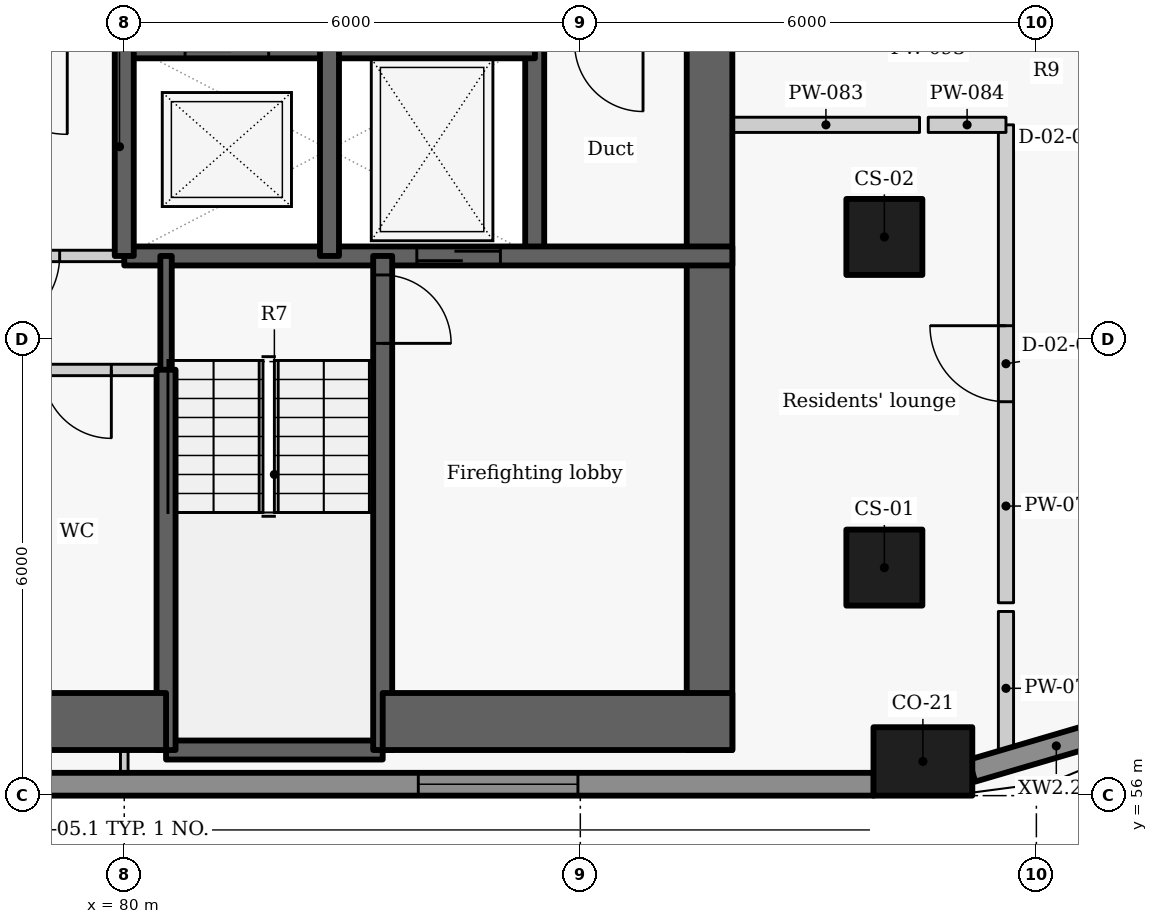
"""IFC4 building model, lengths in metres.
Left out: names, types, materials, properties, quantities, classifications, styles, units other than length and angle.
Written with IfcOpenShell. Run it as: python <this file> out.ifc"""

import sys

from ifc_helpers import new_model, si_unit, direction, frame, frame_2d, origin, origin_2d, place, context, subcontext, project, spatial, rectangle, extrude, element, fill, save


model = new_model("IFC4")
c1 = context("Model", 3, precision=1e-05, world=origin(), true_north=direction((0.0, 1.0)))
c2 = subcontext(c1, "Body", "Model", "MODEL_VIEW")
j1 = project(units=[si_unit("LENGTHUNIT", "METRE"), si_unit("PLANEANGLEUNIT", "RADIAN")], contexts=[c1])
p1 = place(None, origin())
s1 = spatial("IfcSite", under=j1, at=p1, CompositionType="ELEMENT")
p2 = place(p1, origin())
s2 = spatial("IfcBuilding", under=s1, at=p2, CompositionType="ELEMENT")
p3 = place(p2, frame((0.0, 0.0, 160.2)))
s3 = spatial("IfcBuildingStorey", under=s2, at=p3, CompositionType="ELEMENT", Elevation=160.2)
p4 = place(p3, frame((90.507, 56.45, 0.0), z_axis=(0.0, 0.0, 1.0), x_axis=(1.0, 0.0, 0.0)))
e1 = element("IfcColumn", 1, at=p4, inside=s3, PredefinedType="COLUMN", context=c2, shape_type="SweptSolid", body=[
    extrude(rectangle(XDim=1.3, YDim=0.9, at=origin_2d()), origin(), (0.0, 0.0, 1.0), 3.3),
])
for number, where, z_axis, x_axis in (
    (2, (90.0, 59.0, 0.0), (0.0, 0.0, 1.0), (0.0, 1.0, 0.0)),
    (3, (90.0, 63.35, 0.0), (0.0, 0.0, 1.0), (0.0, 1.0, 0.0)),
):
    element("IfcColumn", number, at=place(p3, frame(where, z_axis=z_axis, x_axis=x_axis)), inside=s3, PredefinedType="COLUMN", context=c2, shape_type="SweptSolid", body=[
        extrude(rectangle(XDim=1.0, YDim=1.0, at=origin_2d()), origin(), (0.0, 0.0, 1.0), 3.3),
    ])
p5 = place(p3, frame((69.821, 56.15, 0.0), z_axis=(0.0, 0.0, 1.0), x_axis=(1.0, 0.0, 0.0)))
e4 = element("IfcWall", 4, at=p5, inside=s3, PredefinedType="SOLIDWALL", context=c2, shape_type="SweptSolid", body=[
    extrude(rectangle(XDim=20.04, YDim=0.3, at=frame_2d((10.02, 0.0))), origin(), (0.0, 0.0, 1.0), 2.425),
])
p6 = place(p5, frame((4.051, 0.0, 0.9)))
e5 = element("IfcOpeningElement", 5, at=p6, cuts=e4, PredefinedType="OPENING", context=c2, shape_type="SweptSolid", body=[
    extrude(rectangle(XDim=2.1, YDim=1.1, at=frame_2d((1.05, 0.55))), frame((0.0, 0.16, 0.0), z_axis=(0.0, -1.0, 0.0), x_axis=(1.0, 0.0, 0.0)), (0.0, 0.0, 1.0), 0.32),
])
p7 = place(p5, frame((14.047, 0.0, 0.9)))
e6 = element("IfcOpeningElement", 6, at=p7, cuts=e4, PredefinedType="OPENING", context=c2, shape_type="SweptSolid", body=[
    extrude(rectangle(XDim=2.1, YDim=1.1, at=frame_2d((1.05, 0.55))), frame((0.0, 0.16, 0.0), z_axis=(0.0, -1.0, 0.0), x_axis=(1.0, 0.0, 0.0)), (0.0, 0.0, 1.0), 0.32),
])
p8 = place(p3, frame((91.153, 56.328, 0.0), z_axis=(0.0, 0.0, 1.0), x_axis=(0.959473072336, 0.281800325517, 0.0)))
e7 = element("IfcWall", 7, at=p8, inside=s3, PredefinedType="SOLIDWALL", context=c2, shape_type="SweptSolid", body=[
    extrude(rectangle(XDim=2.312, YDim=0.3, at=frame_2d((1.156, 0.0))), origin(), (0.0, 0.0, 1.0), 2.425),
])
p9 = place(p3, frame((85.4, 63.1, -0.275), z_axis=(0.0, 0.0, 1.0), x_axis=(0.0, 1.0, 0.0)))
e8 = element("IfcWall", 8, at=p9, inside=s3, PredefinedType="SHEAR", context=c2, shape_type="SweptSolid", body=[
    extrude(rectangle(XDim=2.8, YDim=0.25, at=frame_2d((1.4, 0.0))), origin(), (0.0, 0.0, 1.0), 3.3),
])
p10 = place(p3, frame((87.7, 72.2, -0.275), z_axis=(0.0, 0.0, 1.0), x_axis=(0.0, -1.0, 0.0)))
e9 = element("IfcWall", 9, at=p10, inside=s3, PredefinedType="SHEAR", context=c2, shape_type="SweptSolid", body=[
    extrude(rectangle(XDim=15.6, YDim=0.6, at=frame_2d((7.8, 0.0))), origin(), (0.0, 0.0, 1.0), 3.3),
])
p11 = place(p10, frame((3.852, 0.0, 0.275)))
e10 = element("IfcOpeningElement", 10, at=p11, cuts=e9, PredefinedType="OPENING", context=c2, shape_type="SweptSolid", body=[
    extrude(rectangle(XDim=1.5, YDim=2.1, at=frame_2d((0.75, 1.05))), frame((0.0, 0.31, 0.0), z_axis=(0.0, -1.0, 0.0), x_axis=(1.0, 0.0, 0.0)), (0.0, 0.0, 1.0), 0.62),
])
p12 = place(p3, frame((79.997, 65.9, -0.275), z_axis=(0.0, 0.0, 1.0), x_axis=(1.0, 0.0, 0.0)))
e11 = element("IfcWall", 11, at=p12, inside=s3, PredefinedType="SHEAR", context=c2, shape_type="SweptSolid", body=[
    extrude(rectangle(XDim=5.406, YDim=0.4, at=frame_2d((2.703, 0.0))), origin(), (0.0, 0.0, 1.0), 3.3),
])
p13 = place(p12, frame((0.803, 0.0, 0.275)))
e12 = element("IfcOpeningElement", 12, at=p13, cuts=e11, PredefinedType="OPENING", context=c2, shape_type="SweptSolid", body=[
    extrude(rectangle(XDim=1.1, YDim=2.1, at=frame_2d((0.55, 1.05))), frame((0.0, 0.21, 0.0), z_axis=(0.0, -1.0, 0.0), x_axis=(1.0, 0.0, 0.0)), (0.0, 0.0, 1.0), 0.42),
])
p14 = place(p3, frame((80.0, 63.1, -0.275), z_axis=(0.0, 0.0, 1.0), x_axis=(1.0, 0.0, 0.0)))
e13 = element("IfcWall", 13, at=p14, inside=s3, PredefinedType="SHEAR", context=c2, shape_type="SweptSolid", body=[
    extrude(rectangle(XDim=8.0, YDim=0.25, at=frame_2d((4.0, 0.0))), origin(), (0.0, 0.0, 1.0), 3.3),
])
p15 = place(p14, frame((3.849, 0.0, 0.275)))
e14 = element("IfcOpeningElement", 14, at=p15, cuts=e13, PredefinedType="OPENING", context=c2, shape_type="SweptSolid", body=[
    extrude(rectangle(XDim=1.1, YDim=2.1, at=frame_2d((0.55, 1.05))), frame((0.0, 0.135, 0.0), z_axis=(0.0, -1.0, 0.0), x_axis=(1.0, 0.0, 0.0)), (0.0, 0.0, 1.0), 0.27),
])
p16 = place(p3, frame((80.0, 63.1, -0.275), z_axis=(0.0, 0.0, 1.0), x_axis=(0.0, 1.0, 0.0)))
e15 = element("IfcWall", 15, at=p16, inside=s3, PredefinedType="SHEAR", context=c2, shape_type="SweptSolid", body=[
    extrude(rectangle(XDim=2.8, YDim=0.25, at=frame_2d((1.4, 0.0))), origin(), (0.0, 0.0, 1.0), 3.3),
])
p17 = place(p3, frame((80.0, 63.1, 0.0), z_axis=(0.0, 0.0, 1.0), x_axis=(-1.0, 0.0, 0.0)))
e16 = element("IfcWall", 16, at=p17, inside=s3, PredefinedType="PARTITIONING", context=c2, shape_type="SweptSolid", body=[
    extrude(rectangle(XDim=2.7, YDim=0.15, at=frame_2d((1.35, 0.0))), origin(), (0.0, 0.0, 1.0), 3.025),
])
p18 = place(p17, frame((0.85, 0.0, 0.0)))
e17 = element("IfcOpeningElement", 17, at=p18, cuts=e16, PredefinedType="OPENING", context=c2, shape_type="SweptSolid", body=[
    extrude(rectangle(XDim=1.0, YDim=2.1, at=frame_2d((0.5, 1.05))), frame((0.0, 0.085, 0.0), z_axis=(0.0, -1.0, 0.0), x_axis=(1.0, 0.0, 0.0)), (0.0, 0.0, 1.0), 0.17),
])
p19 = place(p3, frame((82.7, 63.1, -0.275), z_axis=(0.0, 0.0, 1.0), x_axis=(0.0, 1.0, 0.0)))
e18 = element("IfcWall", 18, at=p19, inside=s3, PredefinedType="SHEAR", context=c2, shape_type="SweptSolid", body=[
    extrude(rectangle(XDim=2.8, YDim=0.25, at=frame_2d((1.4, 0.0))), origin(), (0.0, 0.0, 1.0), 3.3),
])
p20 = place(p3, frame((80.55, 56.6, -0.275), z_axis=(0.0, 0.0, 1.0), x_axis=(1.0, 0.0, 0.0)))
e19 = element("IfcWall", 19, at=p20, inside=s3, PredefinedType="SHEAR", context=c2, shape_type="SweptSolid", body=[
    extrude(rectangle(XDim=2.85, YDim=0.25, at=frame_2d((1.425, 0.0))), origin(), (0.0, 0.0, 1.0), 3.3),
])
p21 = place(p3, frame((83.4, 63.1, -0.275), z_axis=(0.0, 0.0, 1.0), x_axis=(0.0, -1.0, 0.0)))
e20 = element("IfcWall", 20, at=p21, inside=s3, PredefinedType="SHEAR", context=c2, shape_type="SweptSolid", body=[
    extrude(rectangle(XDim=6.5, YDim=0.25, at=frame_2d((3.25, 0.0))), origin(), (0.0, 0.0, 1.0), 3.3),
])
p22 = place(p21, frame((0.25, 0.0, 0.275)))
e21 = element("IfcOpeningElement", 21, at=p22, cuts=e20, PredefinedType="OPENING", context=c2, shape_type="SweptSolid", body=[
    extrude(rectangle(XDim=0.9, YDim=2.1, at=frame_2d((0.45, 1.05))), frame((0.0, 0.135, 0.0), z_axis=(0.0, -1.0, 0.0), x_axis=(1.0, 0.0, 0.0)), (0.0, 0.0, 1.0), 0.27),
])
p23 = place(p3, frame((80.55, 61.597, -0.275), z_axis=(0.0, 0.0, 1.0), x_axis=(0.0, 1.0, 0.0)))
e22 = element("IfcWall", 22, at=p23, inside=s3, PredefinedType="SHEAR", context=c2, shape_type="SweptSolid", body=[
    extrude(rectangle(XDim=1.503, YDim=0.15, at=frame_2d((0.751, 0.0))), origin(), (0.0, 0.0, 1.0), 3.3),
])
p24 = place(p3, frame((80.55, 56.6, -0.275), z_axis=(0.0, 0.0, 1.0), x_axis=(0.0, 1.0, 0.0)))
e23 = element("IfcWall", 23, at=p24, inside=s3, PredefinedType="SHEAR", context=c2, shape_type="SweptSolid", body=[
    extrude(rectangle(XDim=5.003, YDim=0.25, at=frame_2d((2.501, 0.0))), origin(), (0.0, 0.0, 1.0), 3.3),
])
p25 = place(p3, frame((75.35, 56.975, -0.275), z_axis=(0.0, 0.0, 1.0), x_axis=(1.0, 0.0, 0.0)))
e24 = element("IfcWall", 24, at=p25, inside=s3, PredefinedType="SHEAR", context=c2, shape_type="SweptSolid", body=[
    extrude(rectangle(XDim=5.2, YDim=0.75, at=frame_2d((2.6, 0.0))), origin(), (0.0, 0.0, 1.0), 3.3),
])
p26 = place(p3, frame((83.4, 56.975, -0.275), z_axis=(0.0, 0.0, 1.0), x_axis=(1.0, 0.0, 0.0)))
e25 = element("IfcWall", 25, at=p26, inside=s3, PredefinedType="SHEAR", context=c2, shape_type="SweptSolid", body=[
    extrude(rectangle(XDim=4.6, YDim=0.75, at=frame_2d((2.3, 0.0))), origin(), (0.0, 0.0, 1.0), 3.3),
])
p27 = place(p3, frame((80.55, 61.6, 0.0), z_axis=(0.0, 0.0, 1.0), x_axis=(-1.0, 0.0, 0.0)))
e26 = element("IfcWall", 26, at=p27, inside=s3, PredefinedType="PARTITIONING", context=c2, shape_type="SweptSolid", body=[
    extrude(rectangle(XDim=5.2, YDim=0.15, at=frame_2d((2.6, 0.0))), origin(), (0.0, 0.0, 1.0), 3.025),
])
p28 = place(p27, frame((4.1, 0.0, 0.0)))
e27 = element("IfcOpeningElement", 27, at=p28, cuts=e26, PredefinedType="OPENING", context=c2, shape_type="SweptSolid", body=[
    extrude(rectangle(XDim=0.9, YDim=2.1, at=frame_2d((0.45, 1.05))), frame((0.0, 0.085, 0.0), z_axis=(0.0, -1.0, 0.0), x_axis=(1.0, 0.0, 0.0)), (0.0, 0.0, 1.0), 0.17),
])
p29 = place(p27, frame((2.67, 0.0, 0.0)))
e28 = element("IfcOpeningElement", 28, at=p29, cuts=e26, PredefinedType="OPENING", context=c2, shape_type="SweptSolid", body=[
    extrude(rectangle(XDim=0.9, YDim=2.1, at=frame_2d((0.45, 1.05))), frame((0.0, 0.085, 0.0), z_axis=(0.0, -1.0, 0.0), x_axis=(1.0, 0.0, 0.0)), (0.0, 0.0, 1.0), 0.17),
])
p30 = place(p27, frame((0.72, 0.0, 0.0)))
e29 = element("IfcOpeningElement", 29, at=p30, cuts=e26, PredefinedType="OPENING", context=c2, shape_type="SweptSolid", body=[
    extrude(rectangle(XDim=0.9, YDim=2.1, at=frame_2d((0.45, 1.05))), frame((0.0, 0.085, 0.0), z_axis=(0.0, -1.0, 0.0), x_axis=(1.0, 0.0, 0.0)), (0.0, 0.0, 1.0), 0.17),
])
p31 = place(p3, frame((91.6, 56.401, 0.0), z_axis=(0.0, 0.0, 1.0), x_axis=(0.0, 1.0, 0.0)))
e30 = element("IfcWall", 30, at=p31, inside=s3, PredefinedType="PARTITIONING", context=c2, shape_type="SweptSolid", body=[
    extrude(rectangle(XDim=2.022, YDim=0.2, at=frame_2d((1.011, 0.0))), origin(), (0.0, 0.0, 1.0), 2.405),
])
p32 = place(p3, frame((91.6, 58.537, 0.0), z_axis=(0.0, 0.0, 1.0), x_axis=(0.0, 1.0, 0.0)))
e31 = element("IfcWall", 31, at=p32, inside=s3, PredefinedType="PARTITIONING", context=c2, shape_type="SweptSolid", body=[
    extrude(rectangle(XDim=6.288, YDim=0.2, at=frame_2d((3.144, 0.0))), origin(), (0.0, 0.0, 1.0), 3.025),
])
p33 = place(p32, frame((2.645, 0.0, 0.0)))
e32 = element("IfcOpeningElement", 32, at=p33, cuts=e31, PredefinedType="OPENING", context=c2, shape_type="SweptSolid", body=[
    extrude(rectangle(XDim=1.0, YDim=2.1, at=frame_2d((0.5, 1.05))), frame((0.0, 0.11, 0.0), z_axis=(0.0, -1.0, 0.0), x_axis=(1.0, 0.0, 0.0)), (0.0, 0.0, 1.0), 0.22),
])
p34 = place(p3, frame((88.0, 64.825, 0.0), z_axis=(0.0, 0.0, 1.0), x_axis=(1.0, 0.0, 0.0)))
e33 = element("IfcWall", 33, at=p34, inside=s3, PredefinedType="PARTITIONING", context=c2, shape_type="SweptSolid", body=[
    extrude(rectangle(XDim=2.463, YDim=0.2, at=frame_2d((1.231, 0.0))), origin(), (0.0, 0.0, 1.0), 2.505),
])
p35 = place(p3, frame((90.577, 64.825, 0.0), z_axis=(0.0, 0.0, 1.0), x_axis=(1.0, 0.0, 0.0)))
e34 = element("IfcWall", 34, at=p35, inside=s3, PredefinedType="PARTITIONING", context=c2, shape_type="SweptSolid", body=[
    extrude(rectangle(XDim=1.023, YDim=0.2, at=frame_2d((0.511, 0.0))), origin(), (0.0, 0.0, 1.0), 3.025),
])
p36 = place(p3, frame((80.0, 56.3, 0.0), z_axis=(0.0, 0.0, 1.0), x_axis=(0.0, 1.0, 0.0)))
e35 = element("IfcWall", 35, at=p36, inside=s3, PredefinedType="PARTITIONING", context=c2, shape_type="SweptSolid", body=[
    extrude(rectangle(XDim=0.3, YDim=0.1, at=frame_2d((0.15, 0.0))), origin(), (0.0, 0.0, 1.0), 3.025),
])
p37 = place(p7, origin())
e36 = element("IfcWindow", 36, at=p37, inside=s3, PartitioningType="SINGLE_PANEL", PredefinedType="WINDOW", context=c2, shape_type="SweptSolid", body=[
    extrude(rectangle(XDim=2.1, YDim=1.1, at=frame_2d((1.05, 0.55))), frame((0.0, 0.03, 0.0), z_axis=(0.0, -1.0, 0.0), x_axis=(1.0, 0.0, 0.0)), (0.0, 0.0, 1.0), 0.06),
])
fill(e6, e36)
p38 = place(p15, origin())
e37 = element("IfcDoor", 37, at=p38, inside=s3, OperationType="SLIDING_TO_LEFT", PredefinedType="DOOR", context=c2, shape_type="SweptSolid", body=[
    extrude(rectangle(XDim=1.1, YDim=2.1, at=frame_2d((0.55, 1.05))), frame((0.0, 0.025, 0.0), z_axis=(0.0, -1.0, 0.0), x_axis=(1.0, 0.0, 0.0)), (0.0, 0.0, 1.0), 0.05),
])
fill(e14, e37)
p39 = place(p18, origin())
e38 = element("IfcDoor", 38, at=p39, inside=s3, OperationType="SINGLE_SWING_RIGHT", PredefinedType="DOOR", context=c2, shape_type="SweptSolid", body=[
    extrude(rectangle(XDim=1.0, YDim=2.1, at=frame_2d((0.5, 1.05))), frame((0.0, 0.025, 0.0), z_axis=(0.0, -1.0, 0.0), x_axis=(1.0, 0.0, 0.0)), (0.0, 0.0, 1.0), 0.05),
])
fill(e17, e38)
p40 = place(p30, origin())
e39 = element("IfcDoor", 39, at=p40, inside=s3, OperationType="SINGLE_SWING_LEFT", PredefinedType="DOOR", context=c2, shape_type="SweptSolid", body=[
    extrude(rectangle(XDim=0.9, YDim=2.1, at=frame_2d((0.45, 1.05))), frame((0.0, 0.025, 0.0), z_axis=(0.0, -1.0, 0.0), x_axis=(1.0, 0.0, 0.0)), (0.0, 0.0, 1.0), 0.05),
])
fill(e29, e39)
p41 = place(p22, origin())
e40 = element("IfcDoor", 40, at=p41, inside=s3, OperationType="SINGLE_SWING_RIGHT", PredefinedType="DOOR", context=c2, shape_type="SweptSolid", body=[
    extrude(rectangle(XDim=0.9, YDim=2.1, at=frame_2d((0.45, 1.05))), frame((0.0, 0.025, 0.0), z_axis=(0.0, -1.0, 0.0), x_axis=(1.0, 0.0, 0.0)), (0.0, 0.0, 1.0), 0.05),
])
fill(e21, e40)
p42 = place(p33, origin())
e41 = element("IfcDoor", 41, at=p42, inside=s3, OperationType="SINGLE_SWING_RIGHT", PredefinedType="DOOR", context=c2, shape_type="SweptSolid", body=[
    extrude(rectangle(XDim=1.0, YDim=2.1, at=frame_2d((0.5, 1.05))), frame((0.0, 0.025, 0.0), z_axis=(0.0, -1.0, 0.0), x_axis=(1.0, 0.0, 0.0)), (0.0, 0.0, 1.0), 0.05),
])
fill(e32, e41)
save(model, sys.argv[1])
